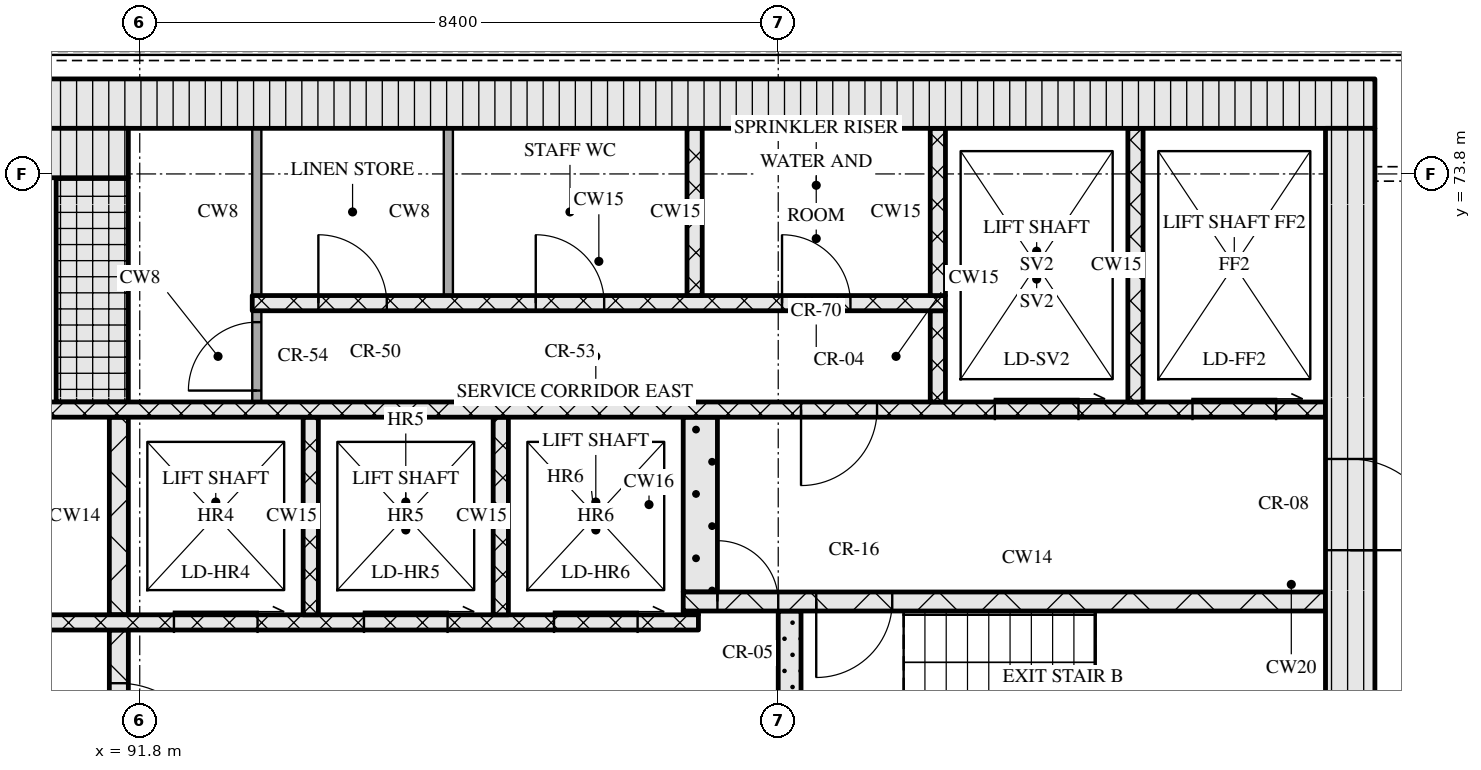
"""IFC4 building model, lengths in metres.
Left out: names, types, materials, properties, quantities, classifications, styles, units other than length and angle.
Written with IfcOpenShell. Run it as: python <this file> out.ifc"""

import sys

from ifc_helpers import new_model, si_unit, direction, frame, frame_2d, origin, place, context, subcontext, project, spatial, rectangle, extrude, element, fill, save


model = new_model("IFC4")
c1 = context("Model", 3, precision=1e-05, world=origin(), true_north=direction((0.0, 1.0)))
c2 = subcontext(c1, "Body", "Model", "MODEL_VIEW")
j1 = project(units=[si_unit("LENGTHUNIT", "METRE"), si_unit("PLANEANGLEUNIT", "RADIAN")], contexts=[c1])
p1 = place(None, origin())
s1 = spatial("IfcSite", under=j1, at=p1, CompositionType="ELEMENT")
p2 = place(p1, origin())
s2 = spatial("IfcBuilding", under=s1, at=p2, CompositionType="ELEMENT")
p3 = place(p2, frame((0.0, 0.0, 212.7)))
s3 = spatial("IfcBuildingStorey", under=s2, at=p3, CompositionType="ELEMENT", Elevation=212.7)
p4 = place(p3, frame((67.15, 74.725, 0.0), z_axis=(0.0, 0.0, 1.0), x_axis=(1.0, 0.0, 0.0)))
e1 = element("IfcWall", 1, at=p4, inside=s3, PredefinedType="SOLIDWALL", context=c2, shape_type="SweptSolid", body=[
    extrude(rectangle(XDim=40.9, YDim=0.65, at=frame_2d((20.45, 0.0))), origin(), (0.0, 0.0, 1.0), 3.32),
])
p5 = place(p3, frame((107.725, 62.4, 0.0), z_axis=(0.0, 0.0, 1.0), x_axis=(0.0, 1.0, 0.0)))
e2 = element("IfcWall", 2, at=p5, inside=s3, PredefinedType="SOLIDWALL", context=c2, shape_type="SweptSolid", body=[
    extrude(rectangle(XDim=12.0, YDim=0.65, at=frame_2d((6.0, 0.0))), origin(), (0.0, 0.0, 1.0), 3.32),
])
p6 = place(p5, frame((6.45, 0.0, 0.0)))
e3 = element("IfcOpeningElement", 3, at=p6, cuts=e2, PredefinedType="OPENING", context=c2, shape_type="SweptSolid", body=[
    extrude(rectangle(XDim=1.2, YDim=2.1, at=frame_2d((0.6, 1.05))), frame((0.0, 0.335, 0.0), z_axis=(0.0, -1.0, 0.0), x_axis=(1.0, 0.0, 0.0)), (0.0, 0.0, 1.0), 0.67),
])
p7 = place(p3, frame((91.525, 65.2, 0.0), z_axis=(0.0, 0.0, 1.0), x_axis=(0.0, 1.0, 0.0)))
e4 = element("IfcWall", 4, at=p7, inside=s3, PredefinedType="SOLIDWALL", context=c2, shape_type="SweptSolid", body=[
    extrude(rectangle(XDim=2.6, YDim=0.25, at=frame_2d((1.3, 0.0))), origin(), (0.0, 0.0, 1.0), 3.32),
])
p8 = place(p7, frame((0.7, 0.0, 0.0)))
e5 = element("IfcOpeningElement", 5, at=p8, cuts=e4, PredefinedType="OPENING", context=c2, shape_type="SweptSolid", body=[
    extrude(rectangle(XDim=1.2, YDim=2.1, at=frame_2d((0.6, 1.05))), frame((0.0, 0.135, 0.0), z_axis=(0.0, -1.0, 0.0), x_axis=(1.0, 0.0, 0.0)), (0.0, 0.0, 1.0), 0.27),
])
p9 = place(p3, frame((100.35, 65.2, 0.0), z_axis=(0.0, 0.0, 1.0), x_axis=(0.0, 1.0, 0.0)))
e6 = element("IfcWall", 6, at=p9, inside=s3, PredefinedType="SOLIDWALL", context=c2, shape_type="SweptSolid", body=[
    extrude(rectangle(XDim=2.85, YDim=0.3, at=frame_2d((1.425, 0.0))), origin(), (0.0, 0.0, 1.0), 3.32),
])
p10 = place(p3, frame((76.05, 67.9, 0.0), z_axis=(0.0, 0.0, 1.0), x_axis=(1.0, 0.0, 0.0)))
e7 = element("IfcWall", 7, at=p10, inside=s3, PredefinedType="SOLIDWALL", context=c2, shape_type="SweptSolid", body=[
    extrude(rectangle(XDim=23.1, YDim=0.2, at=frame_2d((11.55, 0.0))), origin(), (0.0, 0.0, 1.0), 3.32),
])
p11 = place(p10, frame((1.4, 0.0, 0.0)))
e8 = element("IfcOpeningElement", 8, at=p11, cuts=e7, PredefinedType="OPENING", context=c2, shape_type="SweptSolid", body=[
    extrude(rectangle(XDim=0.9, YDim=2.1, at=frame_2d((0.45, 1.05))), frame((0.0, 0.11, 0.0), z_axis=(0.0, -1.0, 0.0), x_axis=(1.0, 0.0, 0.0)), (0.0, 0.0, 1.0), 0.22),
])
p12 = place(p10, frame((5.11, 0.0, 0.0)))
e9 = element("IfcOpeningElement", 9, at=p12, cuts=e7, PredefinedType="OPENING", context=c2, shape_type="SweptSolid", body=[
    extrude(rectangle(XDim=0.9, YDim=2.1, at=frame_2d((0.45, 1.05))), frame((0.0, 0.11, 0.0), z_axis=(0.0, -1.0, 0.0), x_axis=(1.0, 0.0, 0.0)), (0.0, 0.0, 1.0), 0.22),
])
p13 = place(p10, frame((8.45, 0.0, 0.0)))
e10 = element("IfcOpeningElement", 10, at=p13, cuts=e7, PredefinedType="OPENING", context=c2, shape_type="SweptSolid", body=[
    extrude(rectangle(XDim=0.9, YDim=2.1, at=frame_2d((0.45, 1.05))), frame((0.0, 0.11, 0.0), z_axis=(0.0, -1.0, 0.0), x_axis=(1.0, 0.0, 0.0)), (0.0, 0.0, 1.0), 0.22),
])
p14 = place(p10, frame((10.91, 0.0, 0.0)))
e11 = element("IfcOpeningElement", 11, at=p14, cuts=e7, PredefinedType="OPENING", context=c2, shape_type="SweptSolid", body=[
    extrude(rectangle(XDim=0.9, YDim=2.1, at=frame_2d((0.45, 1.05))), frame((0.0, 0.11, 0.0), z_axis=(0.0, -1.0, 0.0), x_axis=(1.0, 0.0, 0.0)), (0.0, 0.0, 1.0), 0.22),
])
p15 = place(p10, frame((13.55, 0.0, 0.0)))
e12 = element("IfcOpeningElement", 12, at=p15, cuts=e7, PredefinedType="OPENING", context=c2, shape_type="SweptSolid", body=[
    extrude(rectangle(XDim=1.0, YDim=2.1, at=frame_2d((0.5, 1.05))), frame((0.0, 0.11, 0.0), z_axis=(0.0, -1.0, 0.0), x_axis=(1.0, 0.0, 0.0)), (0.0, 0.0, 1.0), 0.22),
])
p16 = place(p10, frame((16.2, 0.0, 0.0)))
e13 = element("IfcOpeningElement", 13, at=p16, cuts=e7, PredefinedType="OPENING", context=c2, shape_type="SweptSolid", body=[
    extrude(rectangle(XDim=1.1, YDim=2.1, at=frame_2d((0.55, 1.05))), frame((0.0, 0.11, 0.0), z_axis=(0.0, -1.0, 0.0), x_axis=(1.0, 0.0, 0.0)), (0.0, 0.0, 1.0), 0.22),
])
p17 = place(p10, frame((18.7, 0.0, 0.0)))
e14 = element("IfcOpeningElement", 14, at=p17, cuts=e7, PredefinedType="OPENING", context=c2, shape_type="SweptSolid", body=[
    extrude(rectangle(XDim=1.1, YDim=2.1, at=frame_2d((0.55, 1.05))), frame((0.0, 0.11, 0.0), z_axis=(0.0, -1.0, 0.0), x_axis=(1.0, 0.0, 0.0)), (0.0, 0.0, 1.0), 0.22),
])
p18 = place(p10, frame((21.2, 0.0, 0.0)))
e15 = element("IfcOpeningElement", 15, at=p18, cuts=e7, PredefinedType="OPENING", context=c2, shape_type="SweptSolid", body=[
    extrude(rectangle(XDim=1.1, YDim=2.1, at=frame_2d((0.55, 1.05))), frame((0.0, 0.11, 0.0), z_axis=(0.0, -1.0, 0.0), x_axis=(1.0, 0.0, 0.0)), (0.0, 0.0, 1.0), 0.22),
])
p19 = place(p3, frame((91.525, 68.0, 0.0), z_axis=(0.0, 0.0, 1.0), x_axis=(0.0, 1.0, 0.0)))
e16 = element("IfcWall", 16, at=p19, inside=s3, PredefinedType="SOLIDWALL", context=c2, shape_type="SweptSolid", body=[
    extrude(rectangle(XDim=2.6, YDim=0.25, at=frame_2d((1.3, 0.0))), origin(), (0.0, 0.0, 1.0), 3.32),
])
for number, where, z_axis, x_axis in (
    (17, (94.05, 68.0, 0.0), (0.0, 0.0, 1.0), (0.0, 1.0, 0.0)),
    (18, (96.55, 68.0, 0.0), (0.0, 0.0, 1.0), (0.0, 1.0, 0.0)),
):
    element("IfcWall", number, at=place(p3, frame(where, z_axis=z_axis, x_axis=x_axis)), inside=s3, PredefinedType="SOLIDWALL", context=c2, shape_type="SweptSolid", body=[
        extrude(rectangle(XDim=2.6, YDim=0.2, at=frame_2d((1.3, 0.0))), origin(), (0.0, 0.0, 1.0), 3.32),
    ])
p20 = place(p3, frame((98.95, 68.025, 0.0), z_axis=(0.0, 0.0, 1.0), x_axis=(1.0, 0.0, 0.0)))
e19 = element("IfcWall", 19, at=p20, inside=s3, PredefinedType="SOLIDWALL", context=c2, shape_type="SweptSolid", body=[
    extrude(rectangle(XDim=0.2, YDim=0.05, at=frame_2d((0.1, 0.0))), origin(), (0.0, 0.0, 1.0), 3.32),
])
p21 = place(p3, frame((98.95, 68.175, 0.0), z_axis=(0.0, 0.0, 1.0), x_axis=(1.0, 0.0, 0.0)))
e20 = element("IfcWall", 20, at=p21, inside=s3, PredefinedType="SOLIDWALL", context=c2, shape_type="SweptSolid", body=[
    extrude(rectangle(XDim=8.45, YDim=0.25, at=frame_2d((4.225, 0.0))), origin(), (0.0, 0.0, 1.0), 3.32),
])
p22 = place(p21, frame((0.45, 0.0, 0.0)))
e21 = element("IfcOpeningElement", 21, at=p22, cuts=e20, PredefinedType="OPENING", context=c2, shape_type="SweptSolid", body=[
    extrude(rectangle(XDim=0.8, YDim=2.1, at=frame_2d((0.4, 1.05))), frame((0.0, 0.135, 0.0), z_axis=(0.0, -1.0, 0.0), x_axis=(1.0, 0.0, 0.0)), (0.0, 0.0, 1.0), 0.27),
])
p23 = place(p21, frame((1.75, 0.0, 0.0)))
e22 = element("IfcOpeningElement", 22, at=p23, cuts=e20, PredefinedType="OPENING", context=c2, shape_type="SweptSolid", body=[
    extrude(rectangle(XDim=1.0, YDim=2.1, at=frame_2d((0.5, 1.05))), frame((0.0, 0.135, 0.0), z_axis=(0.0, -1.0, 0.0), x_axis=(1.0, 0.0, 0.0)), (0.0, 0.0, 1.0), 0.27),
])
p24 = place(p3, frame((99.175, 68.3, 0.0), z_axis=(0.0, 0.0, 1.0), x_axis=(0.0, 1.0, 0.0)))
e23 = element("IfcWall", 23, at=p24, inside=s3, PredefinedType="SOLIDWALL", context=c2, shape_type="SweptSolid", body=[
    extrude(rectangle(XDim=2.3, YDim=0.45, at=frame_2d((1.15, 0.0))), origin(), (0.0, 0.0, 1.0), 3.32),
])
p25 = place(p3, frame((67.8, 70.7, 0.0), z_axis=(0.0, 0.0, 1.0), x_axis=(1.0, 0.0, 0.0)))
e24 = element("IfcWall", 24, at=p25, inside=s3, PredefinedType="SOLIDWALL", context=c2, shape_type="SweptSolid", body=[
    extrude(rectangle(XDim=39.6, YDim=0.2, at=frame_2d((19.8, 0.0))), origin(), (0.0, 0.0, 1.0), 3.32),
])
p26 = place(p25, frame((0.65, 0.0, 0.0)))
e25 = element("IfcOpeningElement", 25, at=p26, cuts=e24, PredefinedType="OPENING", context=c2, shape_type="SweptSolid", body=[
    extrude(rectangle(XDim=1.1, YDim=2.1, at=frame_2d((0.55, 1.05))), frame((0.0, 0.11, 0.0), z_axis=(0.0, -1.0, 0.0), x_axis=(1.0, 0.0, 0.0)), (0.0, 0.0, 1.0), 0.22),
])
p27 = place(p25, frame((3.25, 0.0, 0.0)))
e26 = element("IfcOpeningElement", 26, at=p27, cuts=e24, PredefinedType="OPENING", context=c2, shape_type="SweptSolid", body=[
    extrude(rectangle(XDim=1.1, YDim=2.1, at=frame_2d((0.55, 1.05))), frame((0.0, 0.11, 0.0), z_axis=(0.0, -1.0, 0.0), x_axis=(1.0, 0.0, 0.0)), (0.0, 0.0, 1.0), 0.22),
])
p28 = place(p25, frame((5.9, 0.0, 0.0)))
e27 = element("IfcOpeningElement", 27, at=p28, cuts=e24, PredefinedType="OPENING", context=c2, shape_type="SweptSolid", body=[
    extrude(rectangle(XDim=1.0, YDim=2.1, at=frame_2d((0.5, 1.05))), frame((0.0, 0.11, 0.0), z_axis=(0.0, -1.0, 0.0), x_axis=(1.0, 0.0, 0.0)), (0.0, 0.0, 1.0), 0.22),
])
p29 = place(p25, frame((21.7, 0.0, 0.0)))
e28 = element("IfcOpeningElement", 28, at=p29, cuts=e24, PredefinedType="OPENING", context=c2, shape_type="SweptSolid", body=[
    extrude(rectangle(XDim=1.0, YDim=2.1, at=frame_2d((0.5, 1.05))), frame((0.0, 0.11, 0.0), z_axis=(0.0, -1.0, 0.0), x_axis=(1.0, 0.0, 0.0)), (0.0, 0.0, 1.0), 0.22),
])
p30 = place(p25, frame((32.7, 0.0, 0.0)))
e29 = element("IfcOpeningElement", 29, at=p30, cuts=e24, PredefinedType="OPENING", context=c2, shape_type="SweptSolid", body=[
    extrude(rectangle(XDim=1.0, YDim=2.1, at=frame_2d((0.5, 1.05))), frame((0.0, 0.11, 0.0), z_axis=(0.0, -1.0, 0.0), x_axis=(1.0, 0.0, 0.0)), (0.0, 0.0, 1.0), 0.22),
])
p31 = place(p25, frame((35.25, 0.0, 0.0)))
e30 = element("IfcOpeningElement", 30, at=p31, cuts=e24, PredefinedType="OPENING", context=c2, shape_type="SweptSolid", body=[
    extrude(rectangle(XDim=1.1, YDim=2.1, at=frame_2d((0.55, 1.05))), frame((0.0, 0.11, 0.0), z_axis=(0.0, -1.0, 0.0), x_axis=(1.0, 0.0, 0.0)), (0.0, 0.0, 1.0), 0.22),
])
p32 = place(p25, frame((37.85, 0.0, 0.0)))
e31 = element("IfcOpeningElement", 31, at=p32, cuts=e24, PredefinedType="OPENING", context=c2, shape_type="SweptSolid", body=[
    extrude(rectangle(XDim=1.1, YDim=2.1, at=frame_2d((0.55, 1.05))), frame((0.0, 0.11, 0.0), z_axis=(0.0, -1.0, 0.0), x_axis=(1.0, 0.0, 0.0)), (0.0, 0.0, 1.0), 0.22),
])
p33 = place(p3, frame((91.175, 70.8, 0.0), z_axis=(0.0, 0.0, 1.0), x_axis=(0.0, 1.0, 0.0)))
e32 = element("IfcWall", 32, at=p33, inside=s3, PredefinedType="SOLIDWALL", context=c2, shape_type="SweptSolid", body=[
    extrude(rectangle(XDim=2.95, YDim=0.95, at=frame_2d((1.475, 0.0))), origin(), (0.0, 0.0, 1.0), 3.32),
])
p34 = place(p3, frame((93.34, 70.8, 0.0), z_axis=(0.0, 0.0, 1.0), x_axis=(0.0, 1.0, 0.0)))
e33 = element("IfcWall", 33, at=p34, inside=s3, PredefinedType="PARTITIONING", context=c2, shape_type="SweptSolid", body=[
    extrude(rectangle(XDim=1.2, YDim=0.12, at=frame_2d((0.6, 0.0))), origin(), (0.0, 0.0, 1.0), 3.32),
])
p35 = place(p34, frame((0.15, 0.0, 0.0)))
e34 = element("IfcOpeningElement", 34, at=p35, cuts=e33, PredefinedType="OPENING", context=c2, shape_type="SweptSolid", body=[
    extrude(rectangle(XDim=0.9, YDim=2.1, at=frame_2d((0.45, 1.05))), frame((0.0, 0.07, 0.0), z_axis=(0.0, -1.0, 0.0), x_axis=(1.0, 0.0, 0.0)), (0.0, 0.0, 1.0), 0.14),
])
p36 = place(p3, frame((102.3, 70.8, 0.0), z_axis=(0.0, 0.0, 1.0), x_axis=(0.0, 1.0, 0.0)))
e35 = element("IfcWall", 35, at=p36, inside=s3, PredefinedType="SOLIDWALL", context=c2, shape_type="SweptSolid", body=[
    extrude(rectangle(XDim=1.2, YDim=0.2, at=frame_2d((0.6, 0.0))), origin(), (0.0, 0.0, 1.0), 3.32),
])
p37 = place(p3, frame((104.9, 70.8, 0.0), z_axis=(0.0, 0.0, 1.0), x_axis=(0.0, 1.0, 0.0)))
e36 = element("IfcWall", 36, at=p37, inside=s3, PredefinedType="SOLIDWALL", context=c2, shape_type="SweptSolid", body=[
    extrude(rectangle(XDim=3.6, YDim=0.2, at=frame_2d((1.8, 0.0))), origin(), (0.0, 0.0, 1.0), 3.32),
])
p38 = place(p3, frame((93.28, 72.1, 0.0), z_axis=(0.0, 0.0, 1.0), x_axis=(1.0, 0.0, 0.0)))
e37 = element("IfcWall", 37, at=p38, inside=s3, PredefinedType="SOLIDWALL", context=c2, shape_type="SweptSolid", body=[
    extrude(rectangle(XDim=9.12, YDim=0.2, at=frame_2d((4.56, 0.0))), origin(), (0.0, 0.0, 1.0), 3.32),
])
p39 = place(p38, frame((0.87, 0.0, 0.0)))
e38 = element("IfcOpeningElement", 38, at=p39, cuts=e37, PredefinedType="OPENING", context=c2, shape_type="SweptSolid", body=[
    extrude(rectangle(XDim=0.9, YDim=2.1, at=frame_2d((0.45, 1.05))), frame((0.0, 0.11, 0.0), z_axis=(0.0, -1.0, 0.0), x_axis=(1.0, 0.0, 0.0)), (0.0, 0.0, 1.0), 0.22),
])
p40 = place(p38, frame((3.73, 0.0, 0.0)))
e39 = element("IfcOpeningElement", 39, at=p40, cuts=e37, PredefinedType="OPENING", context=c2, shape_type="SweptSolid", body=[
    extrude(rectangle(XDim=0.9, YDim=2.1, at=frame_2d((0.45, 1.05))), frame((0.0, 0.11, 0.0), z_axis=(0.0, -1.0, 0.0), x_axis=(1.0, 0.0, 0.0)), (0.0, 0.0, 1.0), 0.22),
])
p41 = place(p38, frame((6.97, 0.0, 0.0)))
e40 = element("IfcOpeningElement", 40, at=p41, cuts=e37, PredefinedType="OPENING", context=c2, shape_type="SweptSolid", body=[
    extrude(rectangle(XDim=0.9, YDim=2.1, at=frame_2d((0.45, 1.05))), frame((0.0, 0.11, 0.0), z_axis=(0.0, -1.0, 0.0), x_axis=(1.0, 0.0, 0.0)), (0.0, 0.0, 1.0), 0.22),
])
for number, where, z_axis, x_axis in (
    (41, (93.34, 72.2, 0.0), (0.0, 0.0, 1.0), (0.0, 1.0, 0.0)),
    (42, (95.86, 72.2, 0.0), (0.0, 0.0, 1.0), (0.0, 1.0, 0.0)),
):
    element("IfcWall", number, at=place(p3, frame(where, z_axis=z_axis, x_axis=x_axis)), inside=s3, PredefinedType="PARTITIONING", context=c2, shape_type="SweptSolid", body=[
        extrude(rectangle(XDim=2.2, YDim=0.12, at=frame_2d((1.1, 0.0))), origin(), (0.0, 0.0, 1.0), 3.32),
    ])
for number, where, z_axis, x_axis in (
    (43, (99.1, 72.2, 0.0), (0.0, 0.0, 1.0), (0.0, 1.0, 0.0)),
    (44, (102.3, 72.2, 0.0), (0.0, 0.0, 1.0), (0.0, 1.0, 0.0)),
):
    element("IfcWall", number, at=place(p3, frame(where, z_axis=z_axis, x_axis=x_axis)), inside=s3, PredefinedType="SOLIDWALL", context=c2, shape_type="SweptSolid", body=[
        extrude(rectangle(XDim=2.2, YDim=0.2, at=frame_2d((1.1, 0.0))), origin(), (0.0, 0.0, 1.0), 3.32),
    ])
p42 = place(p3, frame((83.55, 74.075, 0.0), z_axis=(0.0, 0.0, 1.0), x_axis=(1.0, 0.0, 0.0)))
e45 = element("IfcWall", 45, at=p42, inside=s3, PredefinedType="SOLIDWALL", context=c2, shape_type="SweptSolid", body=[
    extrude(rectangle(XDim=8.1, YDim=0.65, at=frame_2d((4.05, 0.0))), origin(), (0.0, 0.0, 1.0), 3.32),
])
p43 = place(p8, origin())
e46 = element("IfcDoor", 46, at=p43, inside=s3, OperationType="SINGLE_SWING_RIGHT", PredefinedType="DOOR", context=c2, shape_type="SweptSolid", body=[
    extrude(rectangle(XDim=1.2, YDim=2.1, at=frame_2d((0.6, 1.05))), frame((0.0, 0.025, 0.0), z_axis=(0.0, -1.0, 0.0), x_axis=(1.0, 0.0, 0.0)), (0.0, 0.0, 1.0), 0.05),
])
fill(e5, e46)
p44 = place(p16, origin())
e47 = element("IfcDoor", 47, at=p44, inside=s3, OperationType="SLIDING_TO_RIGHT", PredefinedType="DOOR", context=c2, shape_type="SweptSolid", body=[
    extrude(rectangle(XDim=1.1, YDim=2.1, at=frame_2d((0.55, 1.05))), frame((0.0, 0.025, 0.0), z_axis=(0.0, -1.0, 0.0), x_axis=(1.0, 0.0, 0.0)), (0.0, 0.0, 1.0), 0.05),
])
fill(e13, e47)
p45 = place(p17, origin())
e48 = element("IfcDoor", 48, at=p45, inside=s3, OperationType="SLIDING_TO_RIGHT", PredefinedType="DOOR", context=c2, shape_type="SweptSolid", body=[
    extrude(rectangle(XDim=1.1, YDim=2.1, at=frame_2d((0.55, 1.05))), frame((0.0, 0.025, 0.0), z_axis=(0.0, -1.0, 0.0), x_axis=(1.0, 0.0, 0.0)), (0.0, 0.0, 1.0), 0.05),
])
fill(e14, e48)
p46 = place(p18, origin())
e49 = element("IfcDoor", 49, at=p46, inside=s3, OperationType="SLIDING_TO_RIGHT", PredefinedType="DOOR", context=c2, shape_type="SweptSolid", body=[
    extrude(rectangle(XDim=1.1, YDim=2.1, at=frame_2d((0.55, 1.05))), frame((0.0, 0.025, 0.0), z_axis=(0.0, -1.0, 0.0), x_axis=(1.0, 0.0, 0.0)), (0.0, 0.0, 1.0), 0.05),
])
fill(e15, e49)
p47 = place(p22, origin())
e50 = element("IfcDoor", 50, at=p47, inside=s3, OperationType="SINGLE_SWING_LEFT", PredefinedType="DOOR", context=c2, shape_type="SweptSolid", body=[
    extrude(rectangle(XDim=0.8, YDim=2.1, at=frame_2d((0.4, 1.05))), frame((0.0, 0.025, 0.0), z_axis=(0.0, -1.0, 0.0), x_axis=(1.0, 0.0, 0.0)), (0.0, 0.0, 1.0), 0.05),
])
fill(e21, e50)
p48 = place(p23, origin())
e51 = element("IfcDoor", 51, at=p48, inside=s3, OperationType="SINGLE_SWING_RIGHT", PredefinedType="DOOR", context=c2, shape_type="SweptSolid", body=[
    extrude(rectangle(XDim=1.0, YDim=2.1, at=frame_2d((0.5, 1.05))), frame((0.0, 0.025, 0.0), z_axis=(0.0, -1.0, 0.0), x_axis=(1.0, 0.0, 0.0)), (0.0, 0.0, 1.0), 0.05),
])
fill(e22, e51)
p49 = place(p6, origin())
e52 = element("IfcDoor", 52, at=p49, inside=s3, OperationType="SINGLE_SWING_RIGHT", PredefinedType="DOOR", context=c2, shape_type="SweptSolid", body=[
    extrude(rectangle(XDim=1.2, YDim=2.1, at=frame_2d((0.6, 1.05))), frame((0.0, 0.025, 0.0), z_axis=(0.0, -1.0, 0.0), x_axis=(1.0, 0.0, 0.0)), (0.0, 0.0, 1.0), 0.05),
])
fill(e3, e52)
p50 = place(p30, origin())
e53 = element("IfcDoor", 53, at=p50, inside=s3, OperationType="SINGLE_SWING_RIGHT", PredefinedType="DOOR", context=c2, shape_type="SweptSolid", body=[
    extrude(rectangle(XDim=1.0, YDim=2.1, at=frame_2d((0.5, 1.05))), frame((0.0, 0.025, 0.0), z_axis=(0.0, -1.0, 0.0), x_axis=(1.0, 0.0, 0.0)), (0.0, 0.0, 1.0), 0.05),
])
fill(e29, e53)
p51 = place(p31, origin())
e54 = element("IfcDoor", 54, at=p51, inside=s3, OperationType="SLIDING_TO_RIGHT", PredefinedType="DOOR", context=c2, shape_type="SweptSolid", body=[
    extrude(rectangle(XDim=1.1, YDim=2.1, at=frame_2d((0.55, 1.05))), frame((0.0, 0.025, 0.0), z_axis=(0.0, -1.0, 0.0), x_axis=(1.0, 0.0, 0.0)), (0.0, 0.0, 1.0), 0.05),
])
fill(e30, e54)
p52 = place(p32, origin())
e55 = element("IfcDoor", 55, at=p52, inside=s3, OperationType="SLIDING_TO_RIGHT", PredefinedType="DOOR", context=c2, shape_type="SweptSolid", body=[
    extrude(rectangle(XDim=1.1, YDim=2.1, at=frame_2d((0.55, 1.05))), frame((0.0, 0.025, 0.0), z_axis=(0.0, -1.0, 0.0), x_axis=(1.0, 0.0, 0.0)), (0.0, 0.0, 1.0), 0.05),
])
fill(e31, e55)
p53 = place(p35, origin())
e56 = element("IfcDoor", 56, at=p53, inside=s3, OperationType="SINGLE_SWING_LEFT", PredefinedType="DOOR", context=c2, shape_type="SweptSolid", body=[
    extrude(rectangle(XDim=0.9, YDim=2.1, at=frame_2d((0.45, 1.05))), frame((0.0, 0.025, 0.0), z_axis=(0.0, -1.0, 0.0), x_axis=(1.0, 0.0, 0.0)), (0.0, 0.0, 1.0), 0.05),
])
fill(e34, e56)
p54 = place(p39, origin())
e57 = element("IfcDoor", 57, at=p54, inside=s3, OperationType="SINGLE_SWING_LEFT", PredefinedType="DOOR", context=c2, shape_type="SweptSolid", body=[
    extrude(rectangle(XDim=0.9, YDim=2.1, at=frame_2d((0.45, 1.05))), frame((0.0, 0.025, 0.0), z_axis=(0.0, -1.0, 0.0), x_axis=(1.0, 0.0, 0.0)), (0.0, 0.0, 1.0), 0.05),
])
fill(e38, e57)
p55 = place(p40, origin())
e58 = element("IfcDoor", 58, at=p55, inside=s3, OperationType="SINGLE_SWING_LEFT", PredefinedType="DOOR", context=c2, shape_type="SweptSolid", body=[
    extrude(rectangle(XDim=0.9, YDim=2.1, at=frame_2d((0.45, 1.05))), frame((0.0, 0.025, 0.0), z_axis=(0.0, -1.0, 0.0), x_axis=(1.0, 0.0, 0.0)), (0.0, 0.0, 1.0), 0.05),
])
fill(e39, e58)
p56 = place(p41, origin())
e59 = element("IfcDoor", 59, at=p56, inside=s3, OperationType="SINGLE_SWING_LEFT", PredefinedType="DOOR", context=c2, shape_type="SweptSolid", body=[
    extrude(rectangle(XDim=0.9, YDim=2.1, at=frame_2d((0.45, 1.05))), frame((0.0, 0.025, 0.0), z_axis=(0.0, -1.0, 0.0), x_axis=(1.0, 0.0, 0.0)), (0.0, 0.0, 1.0), 0.05),
])
fill(e40, e59)
save(model, sys.argv[1])
